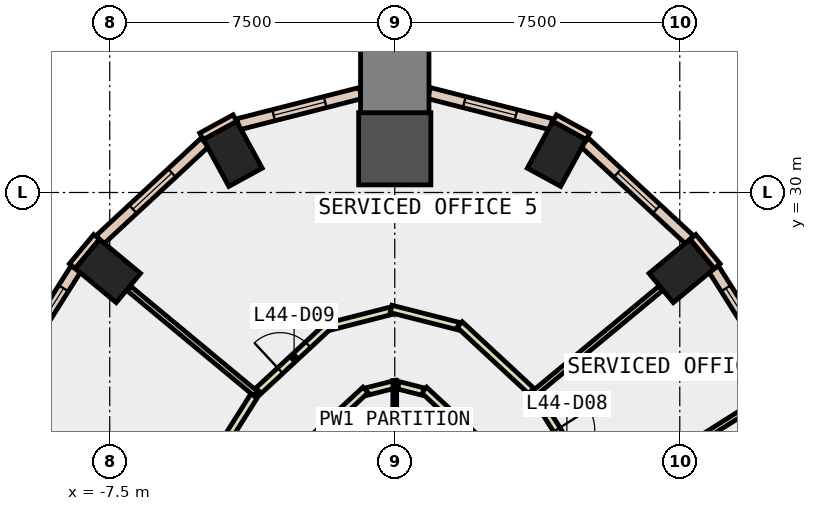
"""IFC4 building model, lengths in metres.
Left out: names, types, materials, properties, quantities, classifications, styles, units other than length and angle.
Written with IfcOpenShell. Run it as: python <this file> out.ifc"""

import sys

from ifc_helpers import new_model, si_unit, direction, frame, frame_2d, origin, origin_2d, place, context, subcontext, project, spatial, rectangle, extrude, element, fill, save


model = new_model("IFC4")
c1 = context("Model", 3, precision=1e-05, world=origin(), true_north=direction((0.0, 1.0)))
c2 = subcontext(c1, "Body", "Model", "MODEL_VIEW")
j1 = project(units=[si_unit("LENGTHUNIT", "METRE"), si_unit("PLANEANGLEUNIT", "RADIAN")], contexts=[c1])
p1 = place(None, origin())
s1 = spatial("IfcSite", under=j1, at=p1, CompositionType="ELEMENT")
p2 = place(p1, origin())
s2 = spatial("IfcBuilding", under=s1, at=p2, CompositionType="ELEMENT")
p3 = place(p2, frame((0.0, 0.0, 198.2)))
s3 = spatial("IfcBuildingStorey", under=s2, at=p3, CompositionType="ELEMENT", Elevation=198.2)
for number, where, z_axis, x_axis in (
    (1, (7.549, 27.935, -0.4), (0.0, 0.0, 1.0), (-0.639, 0.769, 0.0)),
    (2, (4.262, 31.015, -0.4), (0.0, 0.0, 1.0), (-0.878, 0.478, 0.0)),
):
    element("IfcColumn", number, at=place(p3, frame(where, z_axis=z_axis, x_axis=x_axis)), inside=s3, PredefinedType="COLUMN", context=c2, shape_type="SweptSolid", body=[
        extrude(rectangle(XDim=1.0, YDim=1.4, at=origin_2d()), origin(), (0.0, 0.0, 1.0), 4.2),
    ])
p4 = place(p3, frame((0.0, 31.15, -0.4), z_axis=(0.0, 0.0, 1.0), x_axis=(0.0, 1.0, 0.0)))
e3 = element("IfcColumn", 3, at=p4, inside=s3, PredefinedType="COLUMN", context=c2, shape_type="SweptSolid", body=[
    extrude(rectangle(XDim=1.9, YDim=1.9, at=origin_2d()), origin(), (0.0, 0.0, 1.0), 4.2),
])
for number, where, z_axis, x_axis in (
    (4, (-4.262, 31.015, -0.4), (0.0, 0.0, 1.0), (0.878, 0.478, 0.0)),
    (5, (-7.549, 27.935, -0.4), (0.0, 0.0, 1.0), (0.639, 0.769, 0.0)),
):
    element("IfcColumn", number, at=place(p3, frame(where, z_axis=z_axis, x_axis=x_axis)), inside=s3, PredefinedType="COLUMN", context=c2, shape_type="SweptSolid", body=[
        extrude(rectangle(XDim=1.0, YDim=1.4, at=origin_2d()), origin(), (0.0, 0.0, 1.0), 4.2),
    ])
p5 = place(p3, frame((0.0, 33.0, -0.4), z_axis=(0.0, 0.0, 1.0), x_axis=(0.0, 1.0, 0.0)))
e6 = element("IfcColumn", 6, at=p5, inside=s3, PredefinedType="COLUMN", context=c2, shape_type="SweptSolid", body=[
    extrude(rectangle(XDim=1.8, YDim=1.8, at=origin_2d()), origin(), (0.0, 0.0, 1.0), 4.2),
])
for number, where, z_axis, x_axis in (
    (7, (5.084, 31.478, 0.0), (0.0, 0.0, 1.0), (-0.878, 0.478, 0.0)),
    (8, (-4.206, 31.956, 0.0), (0.0, 0.0, 1.0), (-0.878, -0.478, 0.0)),
):
    element("IfcWall", number, at=place(p3, frame(where, z_axis=z_axis, x_axis=x_axis)), inside=s3, PredefinedType="STANDARD", context=c2, shape_type="SweptSolid", body=[
        extrude(rectangle(XDim=1.0, YDim=0.2, at=frame_2d((0.5, 0.0))), origin(), (0.0, 0.0, 1.0), 3.8),
    ])
for number, where, z_axis, x_axis in (
    (9, (8.484, 28.061, 0.0), (0.0, 0.0, 1.0), (-0.638, 0.77, 0.0)),
    (10, (-7.846, 28.831, 0.0), (0.0, 0.0, 1.0), (-0.638, -0.77, 0.0)),
):
    element("IfcWall", number, at=place(p3, frame(where, z_axis=z_axis, x_axis=x_axis)), inside=s3, PredefinedType="STANDARD", context=c2, shape_type="SweptSolid", body=[
        extrude(rectangle(XDim=1.0, YDim=0.2, at=frame_2d((0.5, 0.0))), origin(), (0.0, 0.0, 1.0), 3.8),
    ])
p6 = place(p3, frame((12.241, 21.892, 0.0), z_axis=(0.0, 0.0, 1.0), x_axis=(-0.533680752529, 0.845686025887, 0.0)))
e11 = element("IfcWall", 11, at=p6, inside=s3, PredefinedType="STANDARD", context=c2, shape_type="SweptSolid", body=[
    extrude(rectangle(XDim=7.208, YDim=0.3, at=frame_2d((3.604, 0.0))), origin(), (0.0, 0.0, 1.0), 3.8),
])
p7 = place(p6, frame((0.602, 0.0, 0.9)))
e12 = element("IfcOpeningElement", 12, at=p7, cuts=e11, PredefinedType="OPENING", context=c2, shape_type="SweptSolid", body=[
    extrude(rectangle(XDim=2.4, YDim=2.6, at=frame_2d((1.2, 1.3))), frame((0.0, 0.16, 0.0), z_axis=(0.0, -1.0, 0.0), x_axis=(1.0, 0.0, 0.0)), (0.0, 0.0, 1.0), 0.32),
])
p8 = place(p6, frame((4.206, 0.0, 0.9)))
e13 = element("IfcOpeningElement", 13, at=p8, cuts=e11, PredefinedType="OPENING", context=c2, shape_type="SweptSolid", body=[
    extrude(rectangle(XDim=2.4, YDim=2.6, at=frame_2d((1.2, 1.3))), frame((0.0, 0.16, 0.0), z_axis=(0.0, -1.0, 0.0), x_axis=(1.0, 0.0, 0.0)), (0.0, 0.0, 1.0), 0.32),
])
p9 = place(p3, frame((7.757, 28.756, 0.0), z_axis=(0.0, 0.0, 1.0), x_axis=(-0.732897351132, 0.680339233547, 0.0)))
e14 = element("IfcWall", 14, at=p9, inside=s3, PredefinedType="STANDARD", context=c2, shape_type="SweptSolid", body=[
    extrude(rectangle(XDim=3.767, YDim=0.3, at=frame_2d((1.884, 0.0))), origin(), (0.0, 0.0, 1.0), 3.8),
])
p10 = place(p9, frame((1.184, 0.0, 0.9)))
e15 = element("IfcOpeningElement", 15, at=p10, cuts=e14, PredefinedType="OPENING", context=c2, shape_type="SweptSolid", body=[
    extrude(rectangle(XDim=1.4, YDim=2.6, at=frame_2d((0.7, 1.3))), frame((0.0, 0.16, 0.0), z_axis=(0.0, -1.0, 0.0), x_axis=(1.0, 0.0, 0.0)), (0.0, 0.0, 1.0), 0.32),
])
p11 = place(p3, frame((4.12, 31.796, 0.0), z_axis=(0.0, 0.0, 1.0), x_axis=(-0.969087915137, 0.24671565158, 0.0)))
e16 = element("IfcWall", 16, at=p11, inside=s3, PredefinedType="STANDARD", context=c2, shape_type="SweptSolid", body=[
    extrude(rectangle(XDim=3.324, YDim=0.3, at=frame_2d((1.662, 0.0))), origin(), (0.0, 0.0, 1.0), 3.8),
])
p12 = place(p11, frame((0.962, 0.0, 0.9)))
e17 = element("IfcOpeningElement", 17, at=p12, cuts=e16, PredefinedType="OPENING", context=c2, shape_type="SweptSolid", body=[
    extrude(rectangle(XDim=1.4, YDim=2.6, at=frame_2d((0.7, 1.3))), frame((0.0, 0.16, 0.0), z_axis=(0.0, -1.0, 0.0), x_axis=(1.0, 0.0, 0.0)), (0.0, 0.0, 1.0), 0.32),
])
p13 = place(p3, frame((-0.899, 32.616, 0.0), z_axis=(0.0, 0.0, 1.0), x_axis=(-0.969087915137, -0.24671565158, 0.0)))
e18 = element("IfcWall", 18, at=p13, inside=s3, PredefinedType="STANDARD", context=c2, shape_type="SweptSolid", body=[
    extrude(rectangle(XDim=3.324, YDim=0.3, at=frame_2d((1.662, 0.0))), origin(), (0.0, 0.0, 1.0), 3.8),
])
p14 = place(p13, frame((0.962, 0.0, 0.9)))
e19 = element("IfcOpeningElement", 19, at=p14, cuts=e18, PredefinedType="OPENING", context=c2, shape_type="SweptSolid", body=[
    extrude(rectangle(XDim=1.4, YDim=2.6, at=frame_2d((0.7, 1.3))), frame((0.0, 0.16, 0.0), z_axis=(0.0, -1.0, 0.0), x_axis=(1.0, 0.0, 0.0)), (0.0, 0.0, 1.0), 0.32),
])
p15 = place(p3, frame((-4.996, 31.319, 0.0), z_axis=(0.0, 0.0, 1.0), x_axis=(-0.732897351132, -0.680339233547, 0.0)))
e20 = element("IfcWall", 20, at=p15, inside=s3, PredefinedType="STANDARD", context=c2, shape_type="SweptSolid", body=[
    extrude(rectangle(XDim=3.767, YDim=0.3, at=frame_2d((1.884, 0.0))), origin(), (0.0, 0.0, 1.0), 3.8),
])
p16 = place(p15, frame((1.184, 0.0, 0.9)))
e21 = element("IfcOpeningElement", 21, at=p16, cuts=e20, PredefinedType="OPENING", context=c2, shape_type="SweptSolid", body=[
    extrude(rectangle(XDim=1.4, YDim=2.6, at=frame_2d((0.7, 1.3))), frame((0.0, 0.16, 0.0), z_axis=(0.0, -1.0, 0.0), x_axis=(1.0, 0.0, 0.0)), (0.0, 0.0, 1.0), 0.32),
])
p17 = place(p3, frame((-8.394, 27.988, 0.0), z_axis=(0.0, 0.0, 1.0), x_axis=(-0.533680752529, -0.845686025887, 0.0)))
e22 = element("IfcWall", 22, at=p17, inside=s3, PredefinedType="STANDARD", context=c2, shape_type="SweptSolid", body=[
    extrude(rectangle(XDim=7.208, YDim=0.3, at=frame_2d((3.604, 0.0))), origin(), (0.0, 0.0, 1.0), 3.8),
])
p18 = place(p17, frame((0.602, 0.0, 0.9)))
e23 = element("IfcOpeningElement", 23, at=p18, cuts=e22, PredefinedType="OPENING", context=c2, shape_type="SweptSolid", body=[
    extrude(rectangle(XDim=2.4, YDim=2.6, at=frame_2d((1.2, 1.3))), frame((0.0, 0.16, 0.0), z_axis=(0.0, -1.0, 0.0), x_axis=(1.0, 0.0, 0.0)), (0.0, 0.0, 1.0), 0.32),
])
p19 = place(p17, frame((4.206, 0.0, 0.9)))
e24 = element("IfcOpeningElement", 24, at=p19, cuts=e22, PredefinedType="OPENING", context=c2, shape_type="SweptSolid", body=[
    extrude(rectangle(XDim=2.4, YDim=2.6, at=frame_2d((1.2, 1.3))), frame((0.0, 0.16, 0.0), z_axis=(0.0, -1.0, 0.0), x_axis=(1.0, 0.0, 0.0)), (0.0, 0.0, 1.0), 0.32),
])
p20 = place(p3, frame((2.116, 23.554, 0.0), z_axis=(0.0, 0.0, 1.0), x_axis=(-0.732722533409, 0.680527507919, 0.0)))
e25 = element("IfcWall", 25, at=p20, inside=s3, PredefinedType="PARTITIONING", context=c2, shape_type="SweptSolid", body=[
    extrude(rectangle(XDim=1.838, YDim=0.2, at=frame_2d((0.919, 0.0))), origin(), (0.0, 0.0, 1.0), 3.8),
])
p21 = place(p3, frame((0.745, 24.761, 0.0), z_axis=(0.0, 0.0, 1.0), x_axis=(-0.969081307177, 0.246741605895, 0.0)))
e26 = element("IfcWall", 26, at=p21, inside=s3, PredefinedType="PARTITIONING", context=c2, shape_type="SweptSolid", body=[
    extrude(rectangle(XDim=0.669, YDim=0.2, at=frame_2d((0.334, 0.0))), origin(), (0.0, 0.0, 1.0), 3.8),
])
p22 = place(p3, frame((0.048, 24.963, 0.0), z_axis=(0.0, 0.0, 1.0), x_axis=(-0.969098470359, -0.246674187438, 0.0)))
e27 = element("IfcWall", 27, at=p22, inside=s3, PredefinedType="PARTITIONING", context=c2, shape_type="SweptSolid", body=[
    extrude(rectangle(XDim=0.819, YDim=0.2, at=frame_2d((0.409, 0.0))), origin(), (0.0, 0.0, 1.0), 3.8),
])
p23 = place(p3, frame((-0.769, 24.805, 0.0), z_axis=(0.0, 0.0, 1.0), x_axis=(-0.732722533409, -0.680527507919, 0.0)))
e28 = element("IfcWall", 28, at=p23, inside=s3, PredefinedType="PARTITIONING", context=c2, shape_type="SweptSolid", body=[
    extrude(rectangle(XDim=1.838, YDim=0.2, at=frame_2d((0.919, 0.0))), origin(), (0.0, 0.0, 1.0), 3.8),
])
p24 = place(p3, frame((3.65, 24.731, 0.0), z_axis=(0.0, 0.0, 1.0), x_axis=(0.533756056831, -0.845638499476, 0.0)))
e29 = element("IfcWall", 29, at=p24, inside=s3, PredefinedType="PARTITIONING", context=c2, shape_type="SweptSolid", body=[
    extrude(rectangle(XDim=3.296, YDim=0.2, at=frame_2d((1.648, 0.0))), origin(), (0.0, 0.0, 1.0), 3.8),
])
p25 = place(p24, frame((1.148, 0.0, 0.0)))
e30 = element("IfcOpeningElement", 30, at=p25, cuts=e29, PredefinedType="OPENING", context=c2, shape_type="SweptSolid", body=[
    extrude(rectangle(XDim=1.0, YDim=2.1, at=frame_2d((0.5, 1.05))), frame((0.0, 0.11, 0.0), z_axis=(0.0, -1.0, 0.0), x_axis=(1.0, 0.0, 0.0)), (0.0, 0.0, 1.0), 0.22),
])
p26 = place(p3, frame((-3.59, 24.778, 0.0), z_axis=(0.0, 0.0, 1.0), x_axis=(0.732939008525, 0.680294355248, 0.0)))
e31 = element("IfcWall", 31, at=p26, inside=s3, PredefinedType="PARTITIONING", context=c2, shape_type="SweptSolid", body=[
    extrude(rectangle(XDim=2.569, YDim=0.2, at=frame_2d((1.285, 0.0))), origin(), (0.0, 0.0, 1.0), 3.8),
])
p27 = place(p26, frame((0.785, 0.0, 0.0)))
e32 = element("IfcOpeningElement", 32, at=p27, cuts=e31, PredefinedType="OPENING", context=c2, shape_type="SweptSolid", body=[
    extrude(rectangle(XDim=1.0, YDim=2.1, at=frame_2d((0.5, 1.05))), frame((0.0, 0.11, 0.0), z_axis=(0.0, -1.0, 0.0), x_axis=(1.0, 0.0, 0.0)), (0.0, 0.0, 1.0), 0.22),
])
p28 = place(p3, frame((-1.683, 26.483, 0.0), z_axis=(0.0, 0.0, 1.0), x_axis=(0.969053723172, 0.246849917169, 0.0)))
e33 = element("IfcWall", 33, at=p28, inside=s3, PredefinedType="PARTITIONING", context=c2, shape_type="SweptSolid", body=[
    extrude(rectangle(XDim=1.637, YDim=0.2, at=frame_2d((0.818, 0.0))), origin(), (0.0, 0.0, 1.0), 3.8),
])
p29 = place(p3, frame((-0.097, 26.936, 0.0), z_axis=(0.0, 0.0, 1.0), x_axis=(0.969093707519, -0.246692898252, 0.0)))
e34 = element("IfcWall", 34, at=p29, inside=s3, PredefinedType="PARTITIONING", context=c2, shape_type="SweptSolid", body=[
    extrude(rectangle(XDim=1.837, YDim=0.2, at=frame_2d((0.918, 0.0))), origin(), (0.0, 0.0, 1.0), 3.8),
])
p30 = place(p3, frame((1.707, 26.526, 0.0), z_axis=(0.0, 0.0, 1.0), x_axis=(0.732939008525, -0.680294355248, 0.0)))
e35 = element("IfcWall", 35, at=p30, inside=s3, PredefinedType="PARTITIONING", context=c2, shape_type="SweptSolid", body=[
    extrude(rectangle(XDim=2.569, YDim=0.2, at=frame_2d((1.285, 0.0))), origin(), (0.0, 0.0, 1.0), 3.8),
])
p31 = place(p3, frame((-7.615, 18.449, 0.0), z_axis=(0.0, 0.0, 1.0), x_axis=(0.533699180497, 0.845674396406, 0.0)))
e36 = element("IfcWall", 36, at=p31, inside=s3, PredefinedType="PARTITIONING", context=c2, shape_type="SweptSolid", body=[
    extrude(rectangle(XDim=7.504, YDim=0.2, at=frame_2d((3.752, 0.0))), origin(), (0.0, 0.0, 1.0), 3.8),
])
p32 = place(p31, frame((3.252, 0.0, 0.0)))
e37 = element("IfcOpeningElement", 37, at=p32, cuts=e36, PredefinedType="OPENING", context=c2, shape_type="SweptSolid", body=[
    extrude(rectangle(XDim=1.0, YDim=2.1, at=frame_2d((0.5, 1.05))), frame((0.0, 0.11, 0.0), z_axis=(0.0, -1.0, 0.0), x_axis=(1.0, 0.0, 0.0)), (0.0, 0.0, 1.0), 0.22),
])
p33 = place(p3, frame((0.0, 23.0, 0.0), z_axis=(0.0, 0.0, 1.0), x_axis=(0.0, 1.0, 0.0)))
e38 = element("IfcWall", 38, at=p33, inside=s3, PredefinedType="PARTITIONING", context=c2, shape_type="SweptSolid", body=[
    extrude(rectangle(XDim=2.051, YDim=0.1, at=frame_2d((1.025, 0.0))), origin(), (0.0, 0.0, 1.0), 3.8),
])
p34 = place(p3, frame((5.364, 21.827, 0.0), z_axis=(0.0, 0.0, 1.0), x_axis=(0.845716787596, 0.533632003517, 0.0)))
e39 = element("IfcWall", 39, at=p34, inside=s3, PredefinedType="PARTITIONING", context=c2, shape_type="SweptSolid", body=[
    extrude(rectangle(XDim=5.7, YDim=0.15, at=frame_2d((2.85, 0.0))), origin(), (0.0, 0.0, 1.0), 3.8),
])
p35 = place(p3, frame((3.586, 24.646, 0.0), z_axis=(0.0, 0.0, 1.0), x_axis=(0.769538645463, 0.638600245176, 0.0)))
e40 = element("IfcWall", 40, at=p35, inside=s3, PredefinedType="PARTITIONING", context=c2, shape_type="SweptSolid", body=[
    extrude(rectangle(XDim=4.43, YDim=0.15, at=frame_2d((2.215, 0.0))), origin(), (0.0, 0.0, 1.0), 3.8),
])
p36 = place(p3, frame((-3.663, 24.71, 0.0), z_axis=(0.0, 0.0, 1.0), x_axis=(-0.76953221629, 0.638607992505, 0.0)))
e41 = element("IfcWall", 41, at=p36, inside=s3, PredefinedType="PARTITIONING", context=c2, shape_type="SweptSolid", body=[
    extrude(rectangle(XDim=4.33, YDim=0.15, at=frame_2d((2.165, 0.0))), origin(), (0.0, 0.0, 1.0), 3.8),
])
p37 = place(p8, origin())
e42 = element("IfcWindow", 42, at=p37, inside=s3, PartitioningType="SINGLE_PANEL", PredefinedType="WINDOW", context=c2, shape_type="SweptSolid", body=[
    extrude(rectangle(XDim=2.4, YDim=2.6, at=frame_2d((1.2, 1.3))), frame((0.0, 0.03, 0.0), z_axis=(0.0, -1.0, 0.0), x_axis=(1.0, 0.0, 0.0)), (0.0, 0.0, 1.0), 0.06),
])
fill(e13, e42)
p38 = place(p10, origin())
e43 = element("IfcWindow", 43, at=p38, inside=s3, PartitioningType="SINGLE_PANEL", PredefinedType="WINDOW", context=c2, shape_type="SweptSolid", body=[
    extrude(rectangle(XDim=1.4, YDim=2.6, at=frame_2d((0.7, 1.3))), frame((0.0, 0.03, 0.0), z_axis=(0.0, -1.0, 0.0), x_axis=(1.0, 0.0, 0.0)), (0.0, 0.0, 1.0), 0.06),
])
fill(e15, e43)
p39 = place(p12, origin())
e44 = element("IfcWindow", 44, at=p39, inside=s3, PartitioningType="SINGLE_PANEL", PredefinedType="WINDOW", context=c2, shape_type="SweptSolid", body=[
    extrude(rectangle(XDim=1.4, YDim=2.6, at=frame_2d((0.7, 1.3))), frame((0.0, 0.03, 0.0), z_axis=(0.0, -1.0, 0.0), x_axis=(1.0, 0.0, 0.0)), (0.0, 0.0, 1.0), 0.06),
])
fill(e17, e44)
p40 = place(p14, origin())
e45 = element("IfcWindow", 45, at=p40, inside=s3, PartitioningType="SINGLE_PANEL", PredefinedType="WINDOW", context=c2, shape_type="SweptSolid", body=[
    extrude(rectangle(XDim=1.4, YDim=2.6, at=frame_2d((0.7, 1.3))), frame((0.0, 0.03, 0.0), z_axis=(0.0, -1.0, 0.0), x_axis=(1.0, 0.0, 0.0)), (0.0, 0.0, 1.0), 0.06),
])
fill(e19, e45)
p41 = place(p16, origin())
e46 = element("IfcWindow", 46, at=p41, inside=s3, PartitioningType="SINGLE_PANEL", PredefinedType="WINDOW", context=c2, shape_type="SweptSolid", body=[
    extrude(rectangle(XDim=1.4, YDim=2.6, at=frame_2d((0.7, 1.3))), frame((0.0, 0.03, 0.0), z_axis=(0.0, -1.0, 0.0), x_axis=(1.0, 0.0, 0.0)), (0.0, 0.0, 1.0), 0.06),
])
fill(e21, e46)
p42 = place(p18, origin())
e47 = element("IfcWindow", 47, at=p42, inside=s3, PartitioningType="SINGLE_PANEL", PredefinedType="WINDOW", context=c2, shape_type="SweptSolid", body=[
    extrude(rectangle(XDim=2.4, YDim=2.6, at=frame_2d((1.2, 1.3))), frame((0.0, 0.03, 0.0), z_axis=(0.0, -1.0, 0.0), x_axis=(1.0, 0.0, 0.0)), (0.0, 0.0, 1.0), 0.06),
])
fill(e23, e47)
p43 = place(p25, origin())
e48 = element("IfcDoor", 48, at=p43, inside=s3, OperationType="SINGLE_SWING_LEFT", PredefinedType="DOOR", context=c2, shape_type="SweptSolid", body=[
    extrude(rectangle(XDim=1.0, YDim=2.1, at=frame_2d((0.5, 1.05))), frame((0.0, 0.025, 0.0), z_axis=(0.0, -1.0, 0.0), x_axis=(1.0, 0.0, 0.0)), (0.0, 0.0, 1.0), 0.05),
])
fill(e30, e48)
p44 = place(p27, origin())
e49 = element("IfcDoor", 49, at=p44, inside=s3, OperationType="SINGLE_SWING_LEFT", PredefinedType="DOOR", context=c2, shape_type="SweptSolid", body=[
    extrude(rectangle(XDim=1.0, YDim=2.1, at=frame_2d((0.5, 1.05))), frame((0.0, 0.025, 0.0), z_axis=(0.0, -1.0, 0.0), x_axis=(1.0, 0.0, 0.0)), (0.0, 0.0, 1.0), 0.05),
])
fill(e32, e49)
save(model, sys.argv[1])
